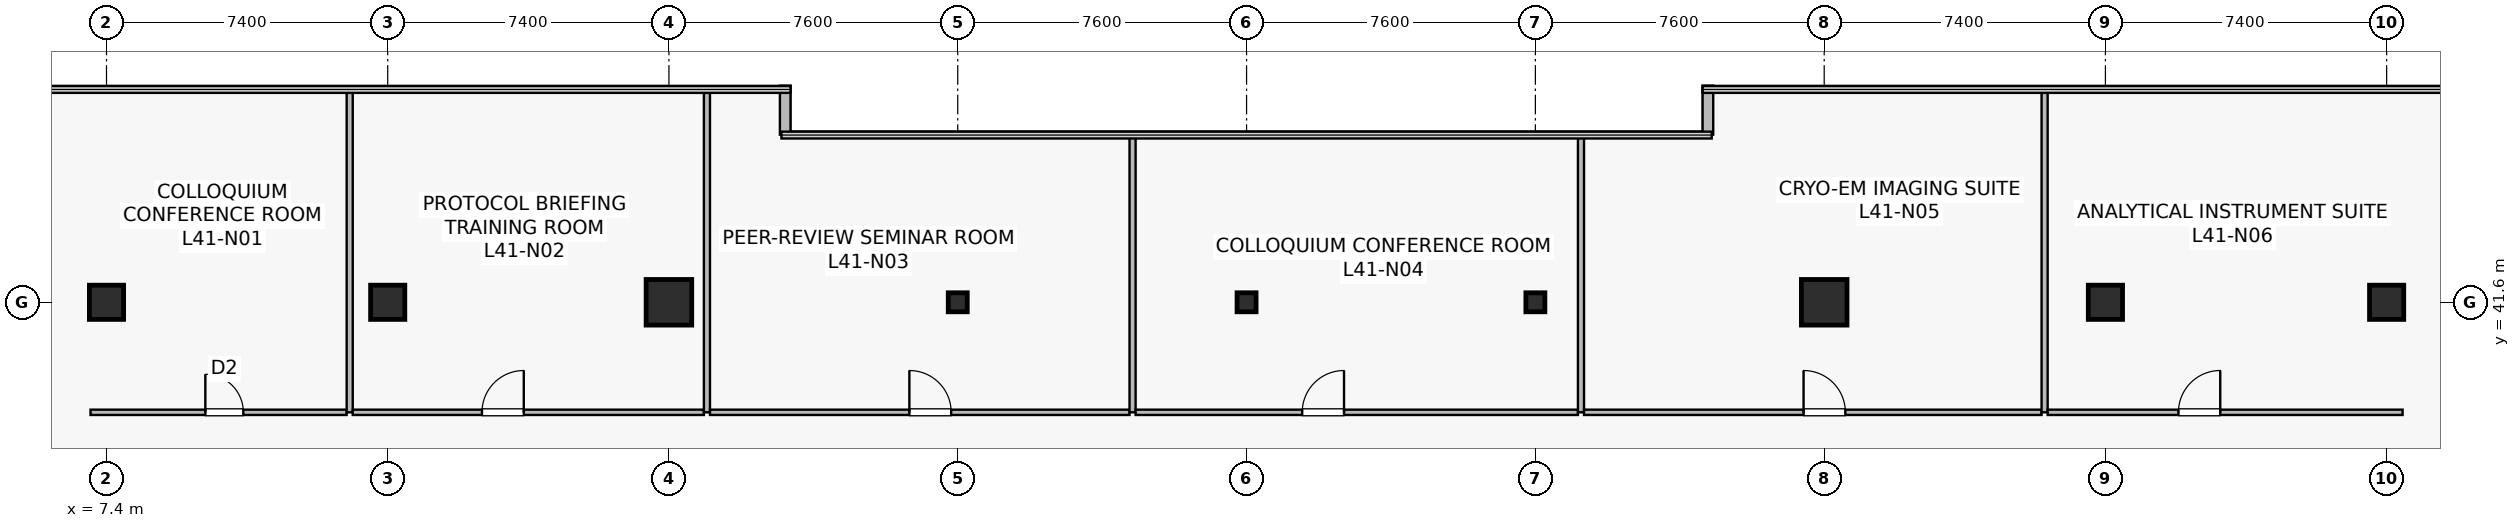
"""IFC4 building model, lengths in metres.
Left out: names, types, materials, properties, quantities, classifications, styles, units other than length and angle.
Written with IfcOpenShell. Run it as: python <this file> out.ifc"""

import sys

from ifc_helpers import new_model, si_unit, direction, frame, frame_2d, origin, origin_2d, place, context, subcontext, project, spatial, rectangle, hollow_rectangle, extrude, source, transform, mapped, element, fill, save


model = new_model("IFC4")
c1 = context("Model", 3, precision=1e-05, world=origin(), true_north=direction((0.0, 1.0)))
c2 = subcontext(c1, "Body", "Model", "MODEL_VIEW")
j1 = project(units=[si_unit("LENGTHUNIT", "METRE"), si_unit("PLANEANGLEUNIT", "RADIAN")], contexts=[c1])
p1 = place(None, origin())
s1 = spatial("IfcSite", under=j1, at=p1, CompositionType="ELEMENT")
p2 = place(p1, origin())
s2 = spatial("IfcBuilding", under=s1, at=p2, CompositionType="ELEMENT")
p3 = place(p2, frame((0.0, 0.0, 170.7)))
s3 = spatial("IfcBuildingStorey", under=s2, at=p3, CompositionType="ELEMENT", Elevation=170.7)
m1 = source(origin(), c2, "Body", "SweptSolid", [
    extrude(rectangle(XDim=0.9, YDim=0.9, at=origin_2d()), origin(), (0.0, 0.0, 1.0), 4.1),
])
p4 = place(p3, frame((14.8, 41.6, 0.0), z_axis=(0.0, 0.0, 1.0), x_axis=(1.0, 0.0, 0.0)))
e1 = element("IfcColumn", 1, at=p4, inside=s3, PredefinedType="COLUMN", context=c2, shape_type="MappedRepresentation", body=[
    mapped(m1, transform((0.0, 0.0, 0.0), scale=1.0)),
])
m2 = source(origin(), c2, "Body", "SweptSolid", [
    extrude(rectangle(XDim=1.2, YDim=1.2, at=origin_2d()), origin(), (0.0, 0.0, 1.0), 4.1),
])
for number, where, z_axis, x_axis in (
    (2, (22.2, 41.6, 0.0), (0.0, 0.0, 1.0), (1.0, 0.0, 0.0)),
    (3, (52.6, 41.6, 0.0), (0.0, 0.0, 1.0), (1.0, 0.0, 0.0)),
):
    element("IfcColumn", number, at=place(p3, frame(where, z_axis=z_axis, x_axis=x_axis)), inside=s3, PredefinedType="COLUMN", context=c2, shape_type="MappedRepresentation", body=[
        mapped(m2, transform((0.0, 0.0, 0.0), scale=1.0)),
    ])
for number, where, z_axis, x_axis in (
    (4, (60.0, 41.6, 0.0), (0.0, 0.0, 1.0), (1.0, 0.0, 0.0)),
    (5, (7.4, 41.6, 0.0), (0.0, 0.0, 1.0), (1.0, 0.0, 0.0)),
    (6, (67.4, 41.6, 0.0), (0.0, 0.0, 1.0), (1.0, 0.0, 0.0)),
):
    element("IfcColumn", number, at=place(p3, frame(where, z_axis=z_axis, x_axis=x_axis)), inside=s3, PredefinedType="COLUMN", context=c2, shape_type="MappedRepresentation", body=[
        mapped(m1, transform((0.0, 0.0, 0.0), scale=1.0)),
    ])
m3 = source(origin(), c2, "Body", "SweptSolid", [
    extrude(hollow_rectangle(XDim=0.5, YDim=0.5, WallThickness=0.022, at=origin_2d()), origin(), (0.0, 0.0, 1.0), 4.1),
])
for number, where, z_axis, x_axis in (
    (7, (29.8, 41.6, 0.0), (0.0, 0.0, 1.0), (1.0, 0.0, 0.0)),
    (8, (37.4, 41.6, 0.0), (0.0, 0.0, 1.0), (1.0, 0.0, 0.0)),
    (9, (45.0, 41.6, 0.0), (0.0, 0.0, 1.0), (1.0, 0.0, 0.0)),
):
    element("IfcColumn", number, at=place(p3, frame(where, z_axis=z_axis, x_axis=x_axis)), inside=s3, PredefinedType="COLUMN", context=c2, shape_type="MappedRepresentation", body=[
        mapped(m3, transform((0.0, 0.0, 0.0), scale=1.0)),
    ])
for number, where, z_axis, x_axis in (
    (10, (49.54, 47.3, 0.0), (0.0, 0.0, 1.0), (0.0, -1.0, 0.0)),
    (11, (25.26, 46.012, 0.0), (0.0, 0.0, 1.0), (0.0, 1.0, 0.0)),
):
    element("IfcWall", number, at=place(p3, frame(where, z_axis=z_axis, x_axis=x_axis)), inside=s3, PredefinedType="STANDARD", context=c2, shape_type="SweptSolid", body=[
        extrude(rectangle(XDim=1.288, YDim=0.28, at=frame_2d((0.644, 0.0))), origin(), (0.0, 0.0, 1.0), 3.79),
    ])
p5 = place(p3, frame((6.98, 38.705, 0.0), z_axis=(0.0, 0.0, 1.0), x_axis=(1.0, 0.0, 0.0)))
e12 = element("IfcWall", 12, at=p5, inside=s3, PredefinedType="PARTITIONING", context=c2, shape_type="SweptSolid", body=[
    extrude(rectangle(XDim=6.74, YDim=0.14, at=frame_2d((3.37, 0.0))), origin(), (0.0, 0.0, 1.0), 3.275),
])
p6 = place(p5, frame((3.021, 0.0, 0.0)))
e13 = element("IfcOpeningElement", 13, at=p6, cuts=e12, PredefinedType="OPENING", context=c2, shape_type="SweptSolid", body=[
    extrude(rectangle(XDim=1.0, YDim=2.15, at=frame_2d((0.5, 1.075))), frame((0.0, 0.08, 0.0), z_axis=(0.0, -1.0, 0.0), x_axis=(1.0, 0.0, 0.0)), (0.0, 0.0, 1.0), 0.16),
])
p7 = place(p3, frame((13.8, 38.705, 0.0), z_axis=(0.0, 0.0, 1.0), x_axis=(0.0, 1.0, 0.0)))
e14 = element("IfcWall", 14, at=p7, inside=s3, PredefinedType="PARTITIONING", context=c2, shape_type="SweptSolid", body=[
    extrude(rectangle(XDim=8.485, YDim=0.16, at=frame_2d((4.242, 0.0))), origin(), (0.0, 0.0, 1.0), 3.075),
])
p8 = place(p3, frame((13.88, 38.705, 0.0), z_axis=(0.0, 0.0, 1.0), x_axis=(1.0, 0.0, 0.0)))
e15 = element("IfcWall", 15, at=p8, inside=s3, PredefinedType="PARTITIONING", context=c2, shape_type="SweptSolid", body=[
    extrude(rectangle(XDim=9.24, YDim=0.14, at=frame_2d((4.62, 0.0))), origin(), (0.0, 0.0, 1.0), 3.187),
])
p9 = place(p8, frame((3.4, 0.0, 0.0)))
e16 = element("IfcOpeningElement", 16, at=p9, cuts=e15, PredefinedType="OPENING", context=c2, shape_type="SweptSolid", body=[
    extrude(rectangle(XDim=1.1, YDim=2.18, at=frame_2d((0.55, 1.09))), frame((0.0, 0.08, 0.0), z_axis=(0.0, -1.0, 0.0), x_axis=(1.0, 0.0, 0.0)), (0.0, 0.0, 1.0), 0.16),
])
p10 = place(p3, frame((23.2, 38.705, 0.0), z_axis=(0.0, 0.0, 1.0), x_axis=(0.0, 1.0, 0.0)))
e17 = element("IfcWall", 17, at=p10, inside=s3, PredefinedType="PARTITIONING", context=c2, shape_type="SweptSolid", body=[
    extrude(rectangle(XDim=8.485, YDim=0.16, at=frame_2d((4.242, 0.0))), origin(), (0.0, 0.0, 1.0), 3.075),
])
p11 = place(p3, frame((23.28, 38.705, 0.0), z_axis=(0.0, 0.0, 1.0), x_axis=(1.0, 0.0, 0.0)))
e18 = element("IfcWall", 18, at=p11, inside=s3, PredefinedType="PARTITIONING", context=c2, shape_type="SweptSolid", body=[
    extrude(rectangle(XDim=11.04, YDim=0.14, at=frame_2d((5.52, 0.0))), origin(), (0.0, 0.0, 1.0), 3.187),
])
p12 = place(p11, frame((5.247, 0.0, 0.0)))
e19 = element("IfcOpeningElement", 19, at=p12, cuts=e18, PredefinedType="OPENING", context=c2, shape_type="SweptSolid", body=[
    extrude(rectangle(XDim=1.1, YDim=2.18, at=frame_2d((0.55, 1.09))), frame((0.0, 0.08, 0.0), z_axis=(0.0, -1.0, 0.0), x_axis=(1.0, 0.0, 0.0)), (0.0, 0.0, 1.0), 0.16),
])
p13 = place(p3, frame((34.4, 38.705, 0.0), z_axis=(0.0, 0.0, 1.0), x_axis=(0.0, 1.0, 0.0)))
e20 = element("IfcWall", 20, at=p13, inside=s3, PredefinedType="PARTITIONING", context=c2, shape_type="SweptSolid", body=[
    extrude(rectangle(XDim=7.285, YDim=0.16, at=frame_2d((3.643, 0.0))), origin(), (0.0, 0.0, 1.0), 3.075),
])
p14 = place(p3, frame((34.48, 38.705, 0.0), z_axis=(0.0, 0.0, 1.0), x_axis=(1.0, 0.0, 0.0)))
e21 = element("IfcWall", 21, at=p14, inside=s3, PredefinedType="PARTITIONING", context=c2, shape_type="SweptSolid", body=[
    extrude(rectangle(XDim=11.64, YDim=0.14, at=frame_2d((5.82, 0.0))), origin(), (0.0, 0.0, 1.0), 3.187),
])
p15 = place(p14, frame((4.385, 0.0, 0.0)))
e22 = element("IfcOpeningElement", 22, at=p15, cuts=e21, PredefinedType="OPENING", context=c2, shape_type="SweptSolid", body=[
    extrude(rectangle(XDim=1.1, YDim=2.18, at=frame_2d((0.55, 1.09))), frame((0.0, 0.08, 0.0), z_axis=(0.0, -1.0, 0.0), x_axis=(1.0, 0.0, 0.0)), (0.0, 0.0, 1.0), 0.16),
])
p16 = place(p3, frame((46.2, 38.705, 0.0), z_axis=(0.0, 0.0, 1.0), x_axis=(0.0, 1.0, 0.0)))
e23 = element("IfcWall", 23, at=p16, inside=s3, PredefinedType="PARTITIONING", context=c2, shape_type="SweptSolid", body=[
    extrude(rectangle(XDim=7.285, YDim=0.16, at=frame_2d((3.643, 0.0))), origin(), (0.0, 0.0, 1.0), 3.075),
])
p17 = place(p3, frame((46.28, 38.705, 0.0), z_axis=(0.0, 0.0, 1.0), x_axis=(1.0, 0.0, 0.0)))
e24 = element("IfcWall", 24, at=p17, inside=s3, PredefinedType="PARTITIONING", context=c2, shape_type="SweptSolid", body=[
    extrude(rectangle(XDim=12.04, YDim=0.14, at=frame_2d((6.02, 0.0))), origin(), (0.0, 0.0, 1.0), 3.187),
])
p18 = place(p17, frame((5.777, 0.0, 0.0)))
e25 = element("IfcOpeningElement", 25, at=p18, cuts=e24, PredefinedType="OPENING", context=c2, shape_type="SweptSolid", body=[
    extrude(rectangle(XDim=1.1, YDim=2.18, at=frame_2d((0.55, 1.09))), frame((0.0, 0.08, 0.0), z_axis=(0.0, -1.0, 0.0), x_axis=(1.0, 0.0, 0.0)), (0.0, 0.0, 1.0), 0.16),
])
p19 = place(p3, frame((58.4, 38.705, 0.0), z_axis=(0.0, 0.0, 1.0), x_axis=(0.0, 1.0, 0.0)))
e26 = element("IfcWall", 26, at=p19, inside=s3, PredefinedType="PARTITIONING", context=c2, shape_type="SweptSolid", body=[
    extrude(rectangle(XDim=8.485, YDim=0.16, at=frame_2d((4.242, 0.0))), origin(), (0.0, 0.0, 1.0), 3.075),
])
p20 = place(p3, frame((58.48, 38.705, 0.0), z_axis=(0.0, 0.0, 1.0), x_axis=(1.0, 0.0, 0.0)))
e27 = element("IfcWall", 27, at=p20, inside=s3, PredefinedType="PARTITIONING", context=c2, shape_type="SweptSolid", body=[
    extrude(rectangle(XDim=9.34, YDim=0.14, at=frame_2d((4.67, 0.0))), origin(), (0.0, 0.0, 1.0), 3.187),
])
p21 = place(p20, frame((3.441, 0.0, 0.0)))
e28 = element("IfcOpeningElement", 28, at=p21, cuts=e27, PredefinedType="OPENING", context=c2, shape_type="SweptSolid", body=[
    extrude(rectangle(XDim=1.1, YDim=2.18, at=frame_2d((0.55, 1.09))), frame((0.0, 0.08, 0.0), z_axis=(0.0, -1.0, 0.0), x_axis=(1.0, 0.0, 0.0)), (0.0, 0.0, 1.0), 0.16),
])
m4 = source(origin(), c2, "Body", "SweptSolid", [
    extrude(rectangle(XDim=1.0, YDim=2.15, at=frame_2d((0.5, 1.075))), frame((0.0, 0.025, 0.0), z_axis=(0.0, -1.0, 0.0), x_axis=(1.0, 0.0, 0.0)), (0.0, 0.0, 1.0), 0.05),
])
p22 = place(p6, origin())
e29 = element("IfcDoor", 29, at=p22, inside=s3, OperationType="SINGLE_SWING_LEFT", PredefinedType="DOOR", context=c2, shape_type="MappedRepresentation", body=[
    mapped(m4, transform((0.0, 0.0, 0.0), scale=1.0)),
])
fill(e13, e29)
m5 = source(origin(), c2, "Body", "SweptSolid", [
    extrude(rectangle(XDim=1.1, YDim=2.18, at=frame_2d((0.55, 1.09))), frame((0.0, 0.025, 0.0), z_axis=(0.0, -1.0, 0.0), x_axis=(1.0, 0.0, 0.0)), (0.0, 0.0, 1.0), 0.05),
])
p23 = place(p9, origin())
e30 = element("IfcDoor", 30, at=p23, inside=s3, OperationType="SINGLE_SWING_RIGHT", PredefinedType="DOOR", context=c2, shape_type="MappedRepresentation", body=[
    mapped(m5, transform((0.0, 0.0, 0.0), scale=1.0)),
])
fill(e16, e30)
p24 = place(p12, origin())
e31 = element("IfcDoor", 31, at=p24, inside=s3, OperationType="SINGLE_SWING_LEFT", PredefinedType="DOOR", context=c2, shape_type="MappedRepresentation", body=[
    mapped(m5, transform((0.0, 0.0, 0.0), scale=1.0)),
])
fill(e19, e31)
p25 = place(p15, origin())
e32 = element("IfcDoor", 32, at=p25, inside=s3, OperationType="SINGLE_SWING_RIGHT", PredefinedType="DOOR", context=c2, shape_type="MappedRepresentation", body=[
    mapped(m5, transform((0.0, 0.0, 0.0), scale=1.0)),
])
fill(e22, e32)
p26 = place(p18, origin())
e33 = element("IfcDoor", 33, at=p26, inside=s3, OperationType="SINGLE_SWING_LEFT", PredefinedType="DOOR", context=c2, shape_type="MappedRepresentation", body=[
    mapped(m5, transform((0.0, 0.0, 0.0), scale=1.0)),
])
fill(e25, e33)
p27 = place(p21, origin())
e34 = element("IfcDoor", 34, at=p27, inside=s3, OperationType="SINGLE_SWING_RIGHT", PredefinedType="DOOR", context=c2, shape_type="MappedRepresentation", body=[
    mapped(m5, transform((0.0, 0.0, 0.0), scale=1.0)),
])
fill(e28, e34)
save(model, sys.argv[1])
